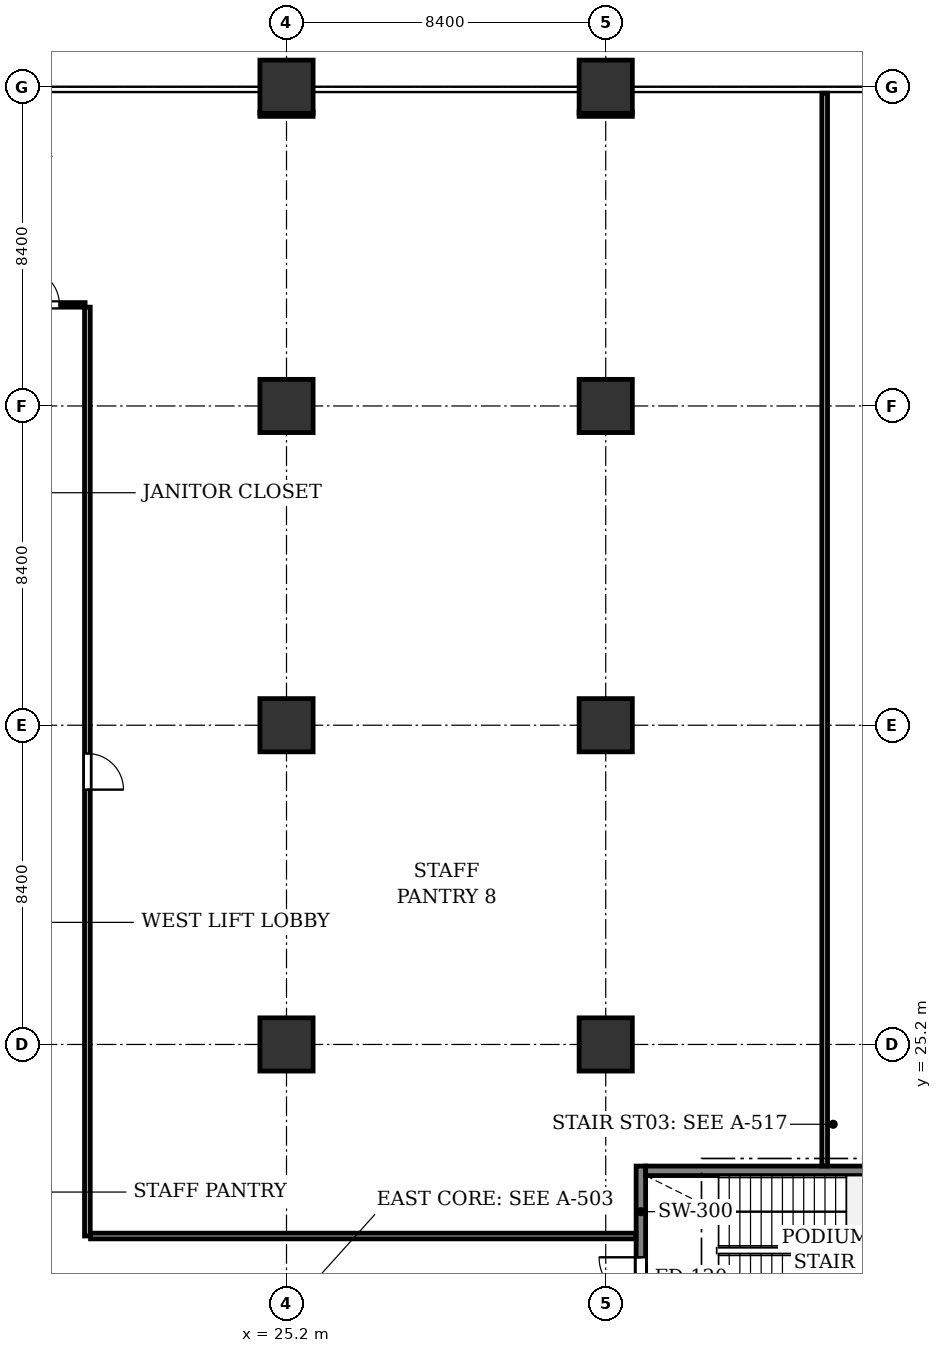
"""IFC4 building model, lengths in metres.
Left out: names, types, materials, properties, quantities, classifications, styles, units other than length and angle.
Written with IfcOpenShell. Run it as: python <this file> out.ifc"""

import sys

from ifc_helpers import new_model, si_unit, direction, frame, frame_2d, origin, origin_2d, place, context, subcontext, project, spatial, rectangle, extrude, element, fill, save


model = new_model("IFC4")
c1 = context("Model", 3, precision=1e-05, world=origin(), true_north=direction((0.0, 1.0)))
c2 = subcontext(c1, "Body", "Model", "MODEL_VIEW")
j1 = project(units=[si_unit("LENGTHUNIT", "METRE"), si_unit("PLANEANGLEUNIT", "RADIAN")], contexts=[c1])
p1 = place(None, origin())
s1 = spatial("IfcSite", under=j1, at=p1, CompositionType="ELEMENT")
p2 = place(p1, origin())
s2 = spatial("IfcBuilding", under=s1, at=p2, CompositionType="ELEMENT")
p3 = place(p2, frame((0.0, 0.0, 5.4)))
s3 = spatial("IfcBuildingStorey", under=s2, at=p3, CompositionType="ELEMENT", Elevation=5.4)
for number, where, z_axis, x_axis in (
    (1, (25.2, 25.2, 0.0), (0.0, 0.0, 1.0), (1.0, 0.0, 0.0)),
    (2, (25.2, 33.6, 0.0), (0.0, 0.0, 1.0), (1.0, 0.0, 0.0)),
    (3, (25.2, 42.0, 0.0), (0.0, 0.0, 1.0), (1.0, 0.0, 0.0)),
    (4, (25.2, 50.4, 0.0), (0.0, 0.0, 1.0), (1.0, 0.0, 0.0)),
    (5, (33.6, 25.2, 0.0), (0.0, 0.0, 1.0), (1.0, 0.0, 0.0)),
    (6, (33.6, 33.6, 0.0), (0.0, 0.0, 1.0), (1.0, 0.0, 0.0)),
    (7, (33.6, 42.0, 0.0), (0.0, 0.0, 1.0), (1.0, 0.0, 0.0)),
    (8, (33.6, 50.4, 0.0), (0.0, 0.0, 1.0), (1.0, 0.0, 0.0)),
):
    element("IfcColumn", number, at=place(p3, frame(where, z_axis=z_axis, x_axis=x_axis)), inside=s3, PredefinedType="COLUMN", context=c2, shape_type="SweptSolid", body=[
        extrude(rectangle(XDim=1.4, YDim=1.4, at=origin_2d()), origin(), (0.0, 0.0, 1.0), 4.8),
    ])
p4 = place(p3, frame((34.525, 17.55, 0.0), z_axis=(0.0, 0.0, 1.0), x_axis=(0.0, 1.0, 0.0)))
e9 = element("IfcWall", 9, at=p4, inside=s3, PredefinedType="SHEAR", context=c2, shape_type="SweptSolid", body=[
    extrude(rectangle(XDim=4.45, YDim=0.25, at=frame_2d((2.225, 0.0))), origin(), (0.0, 0.0, 1.0), 4.525),
])
p5 = place(p4, frame((0.95, 0.0, 0.0)))
e10 = element("IfcOpeningElement", 10, at=p5, cuts=e9, PredefinedType="OPENING", context=c2, shape_type="SweptSolid", body=[
    extrude(rectangle(XDim=1.1, YDim=2.15, at=frame_2d((0.55, 1.075))), frame((0.0, 0.135, 0.0), z_axis=(0.0, -1.0, 0.0), x_axis=(1.0, 0.0, 0.0)), (0.0, 0.0, 1.0), 0.27),
])
p6 = place(p3, frame((34.65, 21.875, 0.0), z_axis=(0.0, 0.0, 1.0), x_axis=(1.0, 0.0, 0.0)))
e11 = element("IfcWall", 11, at=p6, inside=s3, PredefinedType="SHEAR", context=c2, shape_type="SweptSolid", body=[
    extrude(rectangle(XDim=7.95, YDim=0.25, at=frame_2d((3.975, 0.0))), origin(), (0.0, 0.0, 1.0), 4.525),
])
p7 = place(p3, frame((19.96, 44.6, 0.0), z_axis=(0.0, 0.0, 1.0), x_axis=(0.0, -1.0, 0.0)))
e12 = element("IfcWall", 12, at=p7, inside=s3, PredefinedType="PARTITIONING", context=c2, shape_type="SweptSolid", body=[
    extrude(rectangle(XDim=24.44, YDim=0.15, at=frame_2d((12.22, 0.0))), origin(), (0.0, 0.0, 1.0), 3.725),
])
p8 = place(p7, frame((11.745, 0.0, 0.0)))
e13 = element("IfcOpeningElement", 13, at=p8, cuts=e12, PredefinedType="OPENING", context=c2, shape_type="SweptSolid", body=[
    extrude(rectangle(XDim=0.95, YDim=2.15, at=frame_2d((0.475, 1.075))), frame((0.0, 0.085, 0.0), z_axis=(0.0, -1.0, 0.0), x_axis=(1.0, 0.0, 0.0)), (0.0, 0.0, 1.0), 0.17),
])
p9 = place(p3, frame((17.6, 44.66, 0.0), z_axis=(0.0, 0.0, 1.0), x_axis=(1.0, 0.0, 0.0)))
e14 = element("IfcWall", 14, at=p9, inside=s3, PredefinedType="PARTITIONING", context=c2, shape_type="SweptSolid", body=[
    extrude(rectangle(XDim=2.3, YDim=0.12, at=frame_2d((1.15, 0.0))), origin(), (0.0, 0.0, 1.0), 4.525),
])
p10 = place(p9, frame((0.675, 0.0, 0.0)))
e15 = element("IfcOpeningElement", 15, at=p10, cuts=e14, PredefinedType="OPENING", context=c2, shape_type="SweptSolid", body=[
    extrude(rectangle(XDim=0.95, YDim=2.15, at=frame_2d((0.475, 1.075))), frame((0.0, 0.07, 0.0), z_axis=(0.0, -1.0, 0.0), x_axis=(1.0, 0.0, 0.0)), (0.0, 0.0, 1.0), 0.14),
])
p11 = place(p3, frame((39.362, 22.004, 0.0), z_axis=(0.0, 0.0, 1.0), x_axis=(0.0, 1.0, 0.0)))
e16 = element("IfcWall", 16, at=p11, inside=s3, PredefinedType="PARTITIONING", context=c2, shape_type="SweptSolid", body=[
    extrude(rectangle(XDim=28.227, YDim=0.15, at=frame_2d((14.114, 0.0))), origin(), (0.0, 0.0, 1.0), 3.725),
])
p12 = place(p3, frame((34.3, 49.68, 0.0), z_axis=(0.0, 0.0, 1.0), x_axis=(-1.0, 0.0, 0.0)))
e17 = element("IfcWall", 17, at=p12, inside=s3, PredefinedType="PARTITIONING", context=c2, shape_type="SweptSolid", body=[
    extrude(rectangle(XDim=1.4, YDim=0.12, at=frame_2d((0.7, 0.0))), origin(), (0.0, 0.0, 1.0), 3.913),
])
p13 = place(p3, frame((25.9, 49.68, 0.0), z_axis=(0.0, 0.0, 1.0), x_axis=(-1.0, 0.0, 0.0)))
e18 = element("IfcWall", 18, at=p13, inside=s3, PredefinedType="PARTITIONING", context=c2, shape_type="SweptSolid", body=[
    extrude(rectangle(XDim=1.4, YDim=0.12, at=frame_2d((0.7, 0.0))), origin(), (0.0, 0.0, 1.0), 3.913),
])
p14 = place(p3, frame((20.044, 20.16, 0.0), z_axis=(0.0, 0.0, 1.0), x_axis=(1.0, 0.0, 0.0)))
e19 = element("IfcWall", 19, at=p14, inside=s3, PredefinedType="PARTITIONING", context=c2, shape_type="SweptSolid", body=[
    extrude(rectangle(XDim=14.352, YDim=0.15, at=frame_2d((7.176, 0.0))), origin(), (0.0, 0.0, 1.0), 3.913),
])
p15 = place(p5, origin())
e20 = element("IfcDoor", 20, at=p15, inside=s3, OperationType="SINGLE_SWING_RIGHT", PredefinedType="DOOR", context=c2, shape_type="SweptSolid", body=[
    extrude(rectangle(XDim=1.1, YDim=2.15, at=frame_2d((0.55, 1.075))), frame((0.0, 0.025, 0.0), z_axis=(0.0, -1.0, 0.0), x_axis=(1.0, 0.0, 0.0)), (0.0, 0.0, 1.0), 0.05),
])
fill(e10, e20)
p16 = place(p10, origin())
e21 = element("IfcDoor", 21, at=p16, inside=s3, OperationType="SINGLE_SWING_LEFT", PredefinedType="DOOR", context=c2, shape_type="SweptSolid", body=[
    extrude(rectangle(XDim=0.95, YDim=2.15, at=frame_2d((0.475, 1.075))), frame((0.0, 0.025, 0.0), z_axis=(0.0, -1.0, 0.0), x_axis=(1.0, 0.0, 0.0)), (0.0, 0.0, 1.0), 0.05),
])
fill(e15, e21)
p17 = place(p8, origin())
e22 = element("IfcDoor", 22, at=p17, inside=s3, OperationType="SINGLE_SWING_RIGHT", PredefinedType="DOOR", context=c2, shape_type="SweptSolid", body=[
    extrude(rectangle(XDim=0.95, YDim=2.15, at=frame_2d((0.475, 1.075))), frame((0.0, 0.025, 0.0), z_axis=(0.0, -1.0, 0.0), x_axis=(1.0, 0.0, 0.0)), (0.0, 0.0, 1.0), 0.05),
])
fill(e13, e22)
save(model, sys.argv[1])
